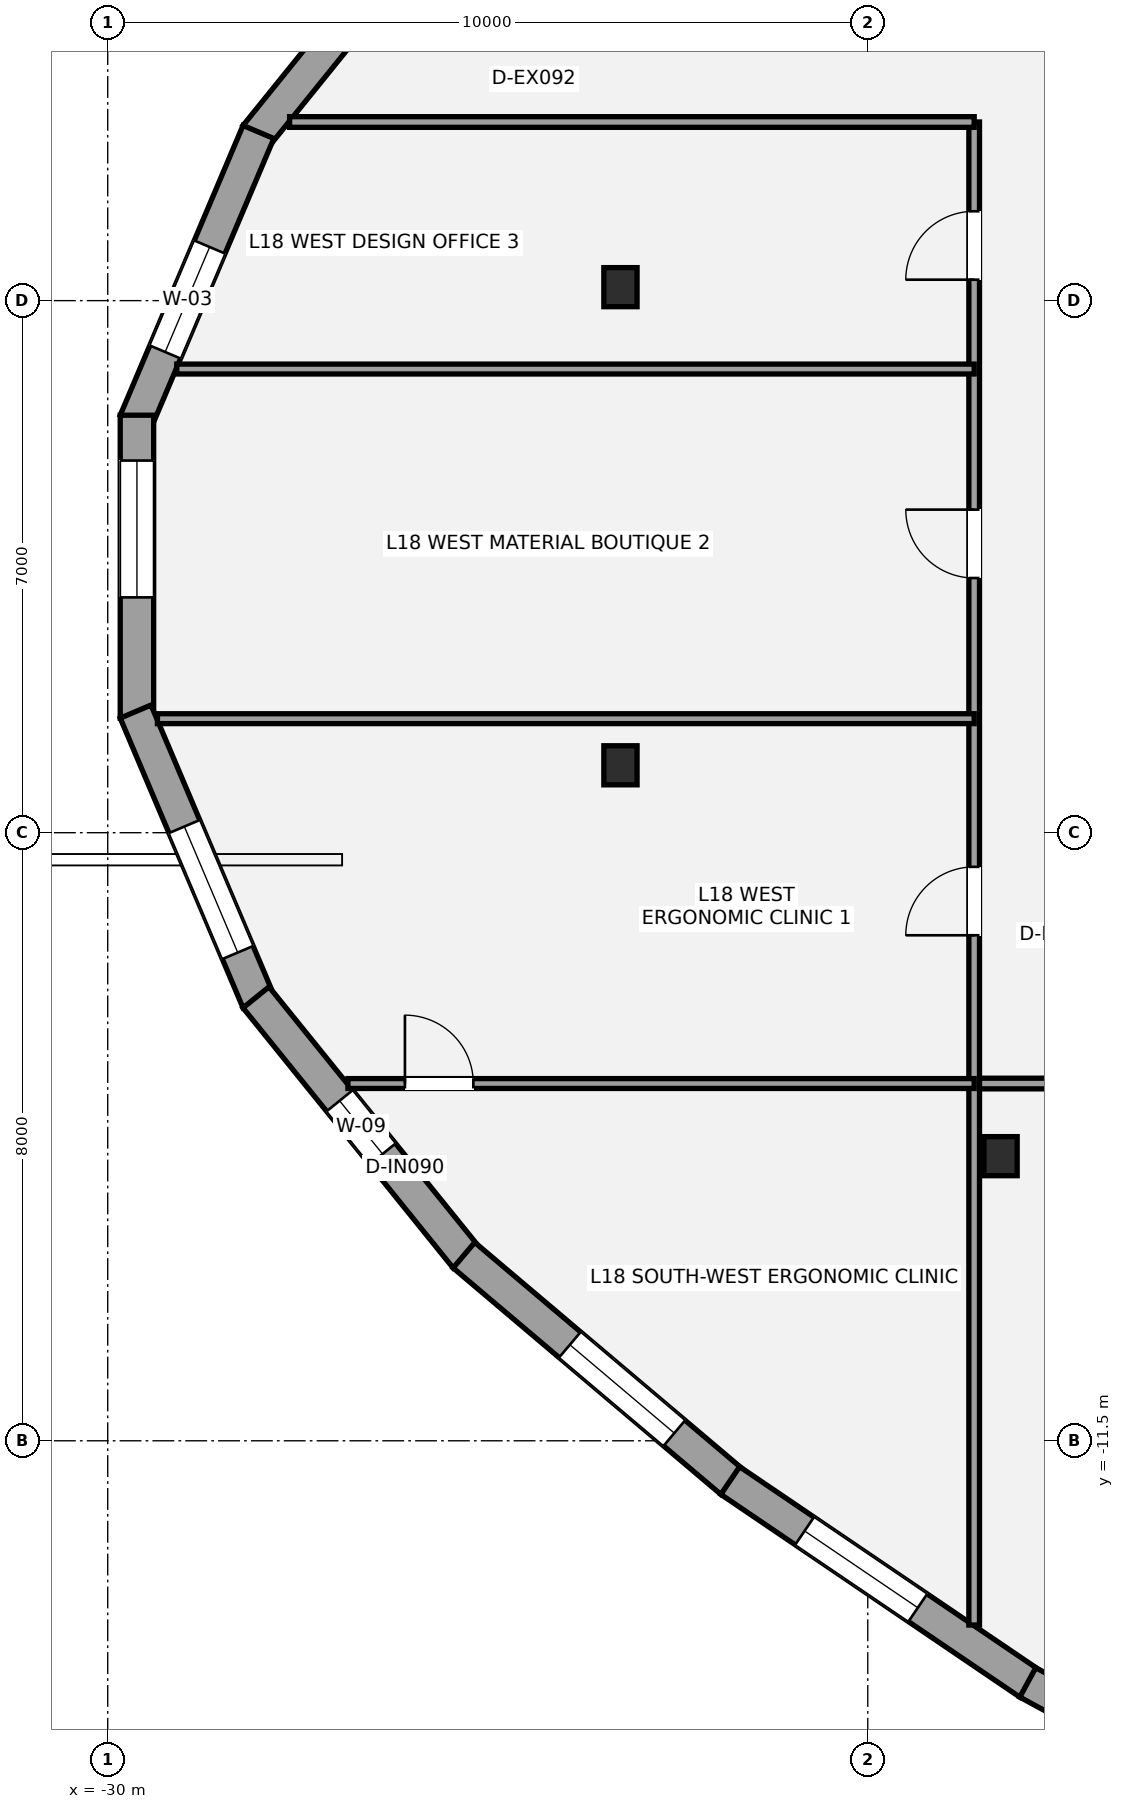
"""IFC4 building model, lengths in metres.
Left out: names, types, materials, properties, quantities, classifications, styles, units other than length and angle.
Written with IfcOpenShell. Run it as: python <this file> out.ifc"""

import sys

from ifc_helpers import new_model, si_unit, direction, frame, frame_2d, origin, origin_2d, place, context, subcontext, project, spatial, rectangle, i_section, extrude, element, fill, save


model = new_model("IFC4")
c1 = context("Model", 3, precision=1e-05, world=origin(), true_north=direction((0.0, 1.0)))
c2 = subcontext(c1, "Body", "Model", "MODEL_VIEW")
j1 = project(units=[si_unit("LENGTHUNIT", "METRE"), si_unit("PLANEANGLEUNIT", "RADIAN")], contexts=[c1])
p1 = place(None, origin())
s1 = spatial("IfcSite", under=j1, at=p1, CompositionType="ELEMENT")
p2 = place(p1, origin())
s2 = spatial("IfcBuilding", under=s1, at=p2, CompositionType="ELEMENT")
p3 = place(p2, frame((0.0, 0.0, 70.2)))
s3 = spatial("IfcBuildingStorey", under=s2, at=p3, CompositionType="ELEMENT", Elevation=70.2)
for number, where, z_axis, x_axis in (
    (1, (-23.254, 3.677, 0.0), (0.0, 0.0, 1.0), (1.0, 0.0, 0.0)),
    (2, (-23.254, -2.613, 0.0), (0.0, 0.0, 1.0), (1.0, 0.0, 0.0)),
    (3, (-18.253, -7.756, 0.0), (0.0, 0.0, 1.0), (1.0, 0.0, 0.0)),
):
    element("IfcColumn", number, at=place(p3, frame(where, z_axis=z_axis, x_axis=x_axis)), inside=s3, PredefinedType="COLUMN", context=c2, shape_type="SweptSolid", body=[
        extrude(i_section(OverallWidth=0.437, OverallDepth=0.514, WebThickness=0.061, FlangeThickness=0.097, at=origin_2d()), origin(), (0.0, 0.0, 1.0), 3.6),
    ])
p4 = place(p3, frame((-28.049, 5.666, 0.0), z_axis=(0.0, 0.0, 1.0), x_axis=(0.628444327975, 0.777854566507, 0.0)))
e4 = element("IfcWall", 4, at=p4, inside=s3, PredefinedType="STANDARD", context=c2, shape_type="SweptSolid", body=[
    extrude(rectangle(XDim=4.399, YDim=0.44, at=frame_2d((2.199, 0.0))), origin(), (0.0, 0.0, 1.0), 2.529),
])
p5 = place(p4, frame((2.649, 0.0, 0.58)))
e5 = element("IfcOpeningElement", 5, at=p5, cuts=e4, PredefinedType="OPENING", context=c2, shape_type="SweptSolid", body=[
    extrude(rectangle(XDim=1.4, YDim=1.55, at=frame_2d((0.7, 0.775))), frame((0.0, 0.23, 0.0), z_axis=(0.0, -1.0, 0.0), x_axis=(1.0, 0.0, 0.0)), (0.0, 0.0, 1.0), 0.46),
])
p6 = place(p3, frame((-29.633, 1.907, 0.0), z_axis=(0.0, 0.0, 1.0), x_axis=(0.39024393086, 0.92071150445, 0.0)))
e6 = element("IfcWall", 6, at=p6, inside=s3, PredefinedType="STANDARD", context=c2, shape_type="SweptSolid", body=[
    extrude(rectangle(XDim=4.14, YDim=0.44, at=frame_2d((2.07, 0.0))), origin(), (0.0, 0.0, 1.0), 2.529),
])
p7 = place(p6, frame((0.997, 0.0, 0.65)))
e7 = element("IfcOpeningElement", 7, at=p7, cuts=e6, PredefinedType="OPENING", context=c2, shape_type="SweptSolid", body=[
    extrude(rectangle(XDim=1.5, YDim=1.7, at=frame_2d((0.75, 0.85))), frame((0.0, 0.23, 0.0), z_axis=(0.0, -1.0, 0.0), x_axis=(1.0, 0.0, 0.0)), (0.0, 0.0, 1.0), 0.46),
])
p8 = place(p3, frame((-29.615, -1.993, 0.0), z_axis=(0.0, 0.0, 1.0), x_axis=(0.0, 1.0, 0.0)))
e8 = element("IfcWall", 8, at=p8, inside=s3, PredefinedType="STANDARD", context=c2, shape_type="SweptSolid", body=[
    extrude(rectangle(XDim=3.985, YDim=0.44, at=frame_2d((1.993, 0.0))), origin(), (0.0, 0.0, 1.0), 2.529),
])
p9 = place(p8, frame((1.588, 0.0, 0.65)))
e9 = element("IfcOpeningElement", 9, at=p9, cuts=e8, PredefinedType="OPENING", context=c2, shape_type="SweptSolid", body=[
    extrude(rectangle(XDim=1.8, YDim=1.7, at=frame_2d((0.9, 0.85))), frame((0.0, 0.23, 0.0), z_axis=(0.0, -1.0, 0.0), x_axis=(1.0, 0.0, 0.0)), (0.0, 0.0, 1.0), 0.46),
])
p10 = place(p3, frame((-28.017, -5.719, 0.0), z_axis=(0.0, 0.0, 1.0), x_axis=(-0.39024393086, 0.92071150445, 0.0)))
e10 = element("IfcWall", 10, at=p10, inside=s3, PredefinedType="STANDARD", context=c2, shape_type="SweptSolid", body=[
    extrude(rectangle(XDim=4.14, YDim=0.44, at=frame_2d((2.07, 0.0))), origin(), (0.0, 0.0, 1.0), 2.529),
])
p11 = place(p10, frame((0.698, 0.0, 0.65)))
e11 = element("IfcOpeningElement", 11, at=p11, cuts=e10, PredefinedType="OPENING", context=c2, shape_type="SweptSolid", body=[
    extrude(rectangle(XDim=1.8, YDim=1.7, at=frame_2d((0.9, 0.85))), frame((0.0, 0.23, 0.0), z_axis=(0.0, -1.0, 0.0), x_axis=(1.0, 0.0, 0.0)), (0.0, 0.0, 1.0), 0.46),
])
p12 = place(p3, frame((-25.284, -9.088, 0.0), z_axis=(0.0, 0.0, 1.0), x_axis=(-0.628444327975, 0.777854566507, 0.0)))
e12 = element("IfcWall", 12, at=p12, inside=s3, PredefinedType="STANDARD", context=c2, shape_type="SweptSolid", body=[
    extrude(rectangle(XDim=4.399, YDim=0.44, at=frame_2d((2.199, 0.0))), origin(), (0.0, 0.0, 1.0), 2.529),
])
p13 = place(p12, frame((1.75, 0.0, 0.58)))
e13 = element("IfcOpeningElement", 13, at=p13, cuts=e12, PredefinedType="OPENING", context=c2, shape_type="SweptSolid", body=[
    extrude(rectangle(XDim=0.9, YDim=1.35, at=frame_2d((0.45, 0.675))), frame((0.0, 0.23, 0.0), z_axis=(0.0, -1.0, 0.0), x_axis=(1.0, 0.0, 0.0)), (0.0, 0.0, 1.0), 0.46),
])
p14 = place(p3, frame((-21.791, -12.037, 0.0), z_axis=(0.0, 0.0, 1.0), x_axis=(-0.763546839071, 0.645752448346, 0.0)))
e14 = element("IfcWall", 14, at=p14, inside=s3, PredefinedType="STANDARD", context=c2, shape_type="SweptSolid", body=[
    extrude(rectangle(XDim=4.614, YDim=0.44, at=frame_2d((2.307, 0.0))), origin(), (0.0, 0.0, 1.0), 2.529),
])
p15 = place(p14, frame((0.988, 0.0, 0.65)))
e15 = element("IfcOpeningElement", 15, at=p15, cuts=e14, PredefinedType="OPENING", context=c2, shape_type="SweptSolid", body=[
    extrude(rectangle(XDim=1.8, YDim=1.7, at=frame_2d((0.9, 0.85))), frame((0.0, 0.23, 0.0), z_axis=(0.0, -1.0, 0.0), x_axis=(1.0, 0.0, 0.0)), (0.0, 0.0, 1.0), 0.46),
])
p16 = place(p3, frame((-17.876, -14.69, 0.0), z_axis=(0.0, 0.0, 1.0), x_axis=(-0.827645395623, 0.561251368911, 0.0)))
e16 = element("IfcWall", 16, at=p16, inside=s3, PredefinedType="STANDARD", context=c2, shape_type="SweptSolid", body=[
    extrude(rectangle(XDim=4.752, YDim=0.44, at=frame_2d((2.376, 0.0))), origin(), (0.0, 0.0, 1.0), 2.529),
])
p17 = place(p16, frame((1.771, 0.0, 0.65)))
e17 = element("IfcOpeningElement", 17, at=p17, cuts=e16, PredefinedType="OPENING", context=c2, shape_type="SweptSolid", body=[
    extrude(rectangle(XDim=1.8, YDim=1.7, at=frame_2d((0.9, 0.85))), frame((0.0, 0.23, 0.0), z_axis=(0.0, -1.0, 0.0), x_axis=(1.0, 0.0, 0.0)), (0.0, 0.0, 1.0), 0.46),
])
p18 = place(p3, frame((-13.501, -17.067, 0.0), z_axis=(0.0, 0.0, 1.0), x_axis=(-0.878571961318, 0.477609996531, 0.0)))
e18 = element("IfcWall", 18, at=p18, inside=s3, PredefinedType="STANDARD", context=c2, shape_type="SweptSolid", body=[
    extrude(rectangle(XDim=5.001, YDim=0.44, at=frame_2d((2.5, 0.0))), origin(), (0.0, 0.0, 1.0), 2.529),
])
p19 = place(p18, frame((1.281, 0.0, 0.65)))
e19 = element("IfcOpeningElement", 19, at=p19, cuts=e18, PredefinedType="OPENING", context=c2, shape_type="SweptSolid", body=[
    extrude(rectangle(XDim=1.8, YDim=1.7, at=frame_2d((0.9, 0.85))), frame((0.0, 0.23, 0.0), z_axis=(0.0, -1.0, 0.0), x_axis=(1.0, 0.0, 0.0)), (0.0, 0.0, 1.0), 0.46),
])
p20 = place(p3, frame((-18.6, -6.8, 0.0), z_axis=(0.0, 0.0, 1.0), x_axis=(1.0, 0.0, 0.0)))
e20 = element("IfcWall", 20, at=p20, inside=s3, PredefinedType="PARTITIONING", context=c2, shape_type="SweptSolid", body=[
    extrude(rectangle(XDim=34.7, YDim=0.14, at=frame_2d((17.35, 0.0))), origin(), (0.0, 0.0, 1.0), 2.853),
])
p21 = place(p20, frame((4.35, 0.0, 0.0)))
e21 = element("IfcOpeningElement", 21, at=p21, cuts=e20, PredefinedType="OPENING", context=c2, shape_type="SweptSolid", body=[
    extrude(rectangle(XDim=0.9, YDim=2.1, at=frame_2d((0.45, 1.05))), frame((0.0, 0.08, 0.0), z_axis=(0.0, -1.0, 0.0), x_axis=(1.0, 0.0, 0.0)), (0.0, 0.0, 1.0), 0.16),
])
p22 = place(p20, frame((13.65, 0.0, 0.0)))
e22 = element("IfcOpeningElement", 22, at=p22, cuts=e20, PredefinedType="OPENING", context=c2, shape_type="SweptSolid", body=[
    extrude(rectangle(XDim=0.9, YDim=2.1, at=frame_2d((0.45, 1.05))), frame((0.0, 0.08, 0.0), z_axis=(0.0, -1.0, 0.0), x_axis=(1.0, 0.0, 0.0)), (0.0, 0.0, 1.0), 0.16),
])
p23 = place(p20, frame((22.65, 0.0, 0.0)))
e23 = element("IfcOpeningElement", 23, at=p23, cuts=e20, PredefinedType="OPENING", context=c2, shape_type="SweptSolid", body=[
    extrude(rectangle(XDim=0.9, YDim=2.1, at=frame_2d((0.45, 1.05))), frame((0.0, 0.08, 0.0), z_axis=(0.0, -1.0, 0.0), x_axis=(1.0, 0.0, 0.0)), (0.0, 0.0, 1.0), 0.16),
])
p24 = place(p20, frame((30.4, 0.0, 0.0)))
e24 = element("IfcOpeningElement", 24, at=p24, cuts=e20, PredefinedType="OPENING", context=c2, shape_type="SweptSolid", body=[
    extrude(rectangle(XDim=1.5, YDim=2.15, at=frame_2d((0.75, 1.075))), frame((0.0, 0.08, 0.0), z_axis=(0.0, -1.0, 0.0), x_axis=(1.0, 0.0, 0.0)), (0.0, 0.0, 1.0), 0.16),
])
p25 = place(p3, frame((-18.6, -13.924, 0.0), z_axis=(0.0, 0.0, 1.0), x_axis=(0.0, 1.0, 0.0)))
e25 = element("IfcWall", 25, at=p25, inside=s3, PredefinedType="PARTITIONING", context=c2, shape_type="SweptSolid", body=[
    extrude(rectangle(XDim=19.774, YDim=0.14, at=frame_2d((9.887, 0.0))), origin(), (0.0, 0.0, 1.0), 2.779),
])
p26 = place(p25, frame((9.074, 0.0, 0.0)))
e26 = element("IfcOpeningElement", 26, at=p26, cuts=e25, PredefinedType="OPENING", context=c2, shape_type="SweptSolid", body=[
    extrude(rectangle(XDim=0.9, YDim=2.1, at=frame_2d((0.45, 1.05))), frame((0.0, 0.08, 0.0), z_axis=(0.0, -1.0, 0.0), x_axis=(1.0, 0.0, 0.0)), (0.0, 0.0, 1.0), 0.16),
])
p27 = place(p25, frame((13.774, 0.0, 0.0)))
e27 = element("IfcOpeningElement", 27, at=p27, cuts=e25, PredefinedType="OPENING", context=c2, shape_type="SweptSolid", body=[
    extrude(rectangle(XDim=0.9, YDim=2.1, at=frame_2d((0.45, 1.05))), frame((0.0, 0.08, 0.0), z_axis=(0.0, -1.0, 0.0), x_axis=(1.0, 0.0, 0.0)), (0.0, 0.0, 1.0), 0.16),
])
p28 = place(p25, frame((17.699, 0.0, 0.0)))
e28 = element("IfcOpeningElement", 28, at=p28, cuts=e25, PredefinedType="OPENING", context=c2, shape_type="SweptSolid", body=[
    extrude(rectangle(XDim=0.9, YDim=2.1, at=frame_2d((0.45, 1.05))), frame((0.0, 0.08, 0.0), z_axis=(0.0, -1.0, 0.0), x_axis=(1.0, 0.0, 0.0)), (0.0, 0.0, 1.0), 0.16),
])
p29 = place(p3, frame((-27.607, 5.85, 0.0), z_axis=(0.0, 0.0, 1.0), x_axis=(1.0, 0.0, 0.0)))
e29 = element("IfcWall", 29, at=p29, inside=s3, PredefinedType="PARTITIONING", context=c2, shape_type="SweptSolid", body=[
    extrude(rectangle(XDim=9.007, YDim=0.14, at=frame_2d((4.504, 0.0))), origin(), (0.0, 0.0, 1.0), 3.4),
])
p30 = place(p3, frame((-26.84, -6.8, 0.0), z_axis=(0.0, 0.0, 1.0), x_axis=(1.0, 0.0, 0.0)))
e30 = element("IfcWall", 30, at=p30, inside=s3, PredefinedType="PARTITIONING", context=c2, shape_type="SweptSolid", body=[
    extrude(rectangle(XDim=8.24, YDim=0.13, at=frame_2d((4.12, 0.0))), origin(), (0.0, 0.0, 1.0), 2.779),
])
p31 = place(p30, frame((0.75, 0.0, 0.0)))
e31 = element("IfcOpeningElement", 31, at=p31, cuts=e30, PredefinedType="OPENING", context=c2, shape_type="SweptSolid", body=[
    extrude(rectangle(XDim=0.9, YDim=2.1, at=frame_2d((0.45, 1.05))), frame((0.0, 0.075, 0.0), z_axis=(0.0, -1.0, 0.0), x_axis=(1.0, 0.0, 0.0)), (0.0, 0.0, 1.0), 0.15),
])
p32 = place(p3, frame((-29.346, -2.0, 0.0), z_axis=(0.0, 0.0, 1.0), x_axis=(1.0, 0.0, 0.0)))
e32 = element("IfcWall", 32, at=p32, inside=s3, PredefinedType="PARTITIONING", context=c2, shape_type="SweptSolid", body=[
    extrude(rectangle(XDim=10.746, YDim=0.13, at=frame_2d((5.373, 0.0))), origin(), (0.0, 0.0, 1.0), 2.841),
])
p33 = place(p3, frame((-29.092, 2.6, 0.0), z_axis=(0.0, 0.0, 1.0), x_axis=(1.0, 0.0, 0.0)))
e33 = element("IfcWall", 33, at=p33, inside=s3, PredefinedType="PARTITIONING", context=c2, shape_type="SweptSolid", body=[
    extrude(rectangle(XDim=10.491, YDim=0.13, at=frame_2d((5.246, 0.0))), origin(), (0.0, 0.0, 1.0), 2.841),
])
p34 = place(p7, origin())
e34 = element("IfcWindow", 34, at=p34, inside=s3, PartitioningType="SINGLE_PANEL", PredefinedType="WINDOW", context=c2, shape_type="SweptSolid", body=[
    extrude(rectangle(XDim=1.5, YDim=1.7, at=frame_2d((0.75, 0.85))), frame((0.0, -0.01, 0.0), z_axis=(0.0, -1.0, 0.0), x_axis=(1.0, 0.0, 0.0)), (0.0, 0.0, 1.0), 0.06),
])
fill(e7, e34)
p35 = place(p9, origin())
e35 = element("IfcWindow", 35, at=p35, inside=s3, PartitioningType="SINGLE_PANEL", PredefinedType="WINDOW", context=c2, shape_type="SweptSolid", body=[
    extrude(rectangle(XDim=1.8, YDim=1.7, at=frame_2d((0.9, 0.85))), frame((0.0, -0.01, 0.0), z_axis=(0.0, -1.0, 0.0), x_axis=(1.0, 0.0, 0.0)), (0.0, 0.0, 1.0), 0.06),
])
fill(e9, e35)
p36 = place(p11, origin())
e36 = element("IfcWindow", 36, at=p36, inside=s3, PartitioningType="SINGLE_PANEL", PredefinedType="WINDOW", context=c2, shape_type="SweptSolid", body=[
    extrude(rectangle(XDim=1.8, YDim=1.7, at=frame_2d((0.9, 0.85))), frame((0.0, -0.01, 0.0), z_axis=(0.0, -1.0, 0.0), x_axis=(1.0, 0.0, 0.0)), (0.0, 0.0, 1.0), 0.06),
])
fill(e11, e36)
p37 = place(p13, origin())
e37 = element("IfcWindow", 37, at=p37, inside=s3, PartitioningType="SINGLE_PANEL", PredefinedType="WINDOW", context=c2, shape_type="SweptSolid", body=[
    extrude(rectangle(XDim=0.9, YDim=1.35, at=frame_2d((0.45, 0.675))), frame((0.0, -0.01, 0.0), z_axis=(0.0, -1.0, 0.0), x_axis=(1.0, 0.0, 0.0)), (0.0, 0.0, 1.0), 0.06),
])
fill(e13, e37)
p38 = place(p15, origin())
e38 = element("IfcWindow", 38, at=p38, inside=s3, PartitioningType="SINGLE_PANEL", PredefinedType="WINDOW", context=c2, shape_type="SweptSolid", body=[
    extrude(rectangle(XDim=1.8, YDim=1.7, at=frame_2d((0.9, 0.85))), frame((0.0, -0.01, 0.0), z_axis=(0.0, -1.0, 0.0), x_axis=(1.0, 0.0, 0.0)), (0.0, 0.0, 1.0), 0.06),
])
fill(e15, e38)
p39 = place(p17, origin())
e39 = element("IfcWindow", 39, at=p39, inside=s3, PartitioningType="SINGLE_PANEL", PredefinedType="WINDOW", context=c2, shape_type="SweptSolid", body=[
    extrude(rectangle(XDim=1.8, YDim=1.7, at=frame_2d((0.9, 0.85))), frame((0.0, -0.01, 0.0), z_axis=(0.0, -1.0, 0.0), x_axis=(1.0, 0.0, 0.0)), (0.0, 0.0, 1.0), 0.06),
])
fill(e17, e39)
p40 = place(p31, origin())
e40 = element("IfcDoor", 40, at=p40, inside=s3, OperationType="SINGLE_SWING_LEFT", PredefinedType="DOOR", context=c2, shape_type="SweptSolid", body=[
    extrude(rectangle(XDim=0.9, YDim=2.1, at=frame_2d((0.45, 1.05))), frame((0.0, 0.025, 0.0), z_axis=(0.0, -1.0, 0.0), x_axis=(1.0, 0.0, 0.0)), (0.0, 0.0, 1.0), 0.05),
])
fill(e31, e40)
p41 = place(p26, origin())
e41 = element("IfcDoor", 41, at=p41, inside=s3, OperationType="SINGLE_SWING_LEFT", PredefinedType="DOOR", context=c2, shape_type="SweptSolid", body=[
    extrude(rectangle(XDim=0.9, YDim=2.1, at=frame_2d((0.45, 1.05))), frame((0.0, 0.025, 0.0), z_axis=(0.0, -1.0, 0.0), x_axis=(1.0, 0.0, 0.0)), (0.0, 0.0, 1.0), 0.05),
])
fill(e26, e41)
p42 = place(p27, origin())
e42 = element("IfcDoor", 42, at=p42, inside=s3, OperationType="SINGLE_SWING_RIGHT", PredefinedType="DOOR", context=c2, shape_type="SweptSolid", body=[
    extrude(rectangle(XDim=0.9, YDim=2.1, at=frame_2d((0.45, 1.05))), frame((0.0, 0.025, 0.0), z_axis=(0.0, -1.0, 0.0), x_axis=(1.0, 0.0, 0.0)), (0.0, 0.0, 1.0), 0.05),
])
fill(e27, e42)
p43 = place(p28, origin())
e43 = element("IfcDoor", 43, at=p43, inside=s3, OperationType="SINGLE_SWING_LEFT", PredefinedType="DOOR", context=c2, shape_type="SweptSolid", body=[
    extrude(rectangle(XDim=0.9, YDim=2.1, at=frame_2d((0.45, 1.05))), frame((0.0, 0.025, 0.0), z_axis=(0.0, -1.0, 0.0), x_axis=(1.0, 0.0, 0.0)), (0.0, 0.0, 1.0), 0.05),
])
fill(e28, e43)
save(model, sys.argv[1])
